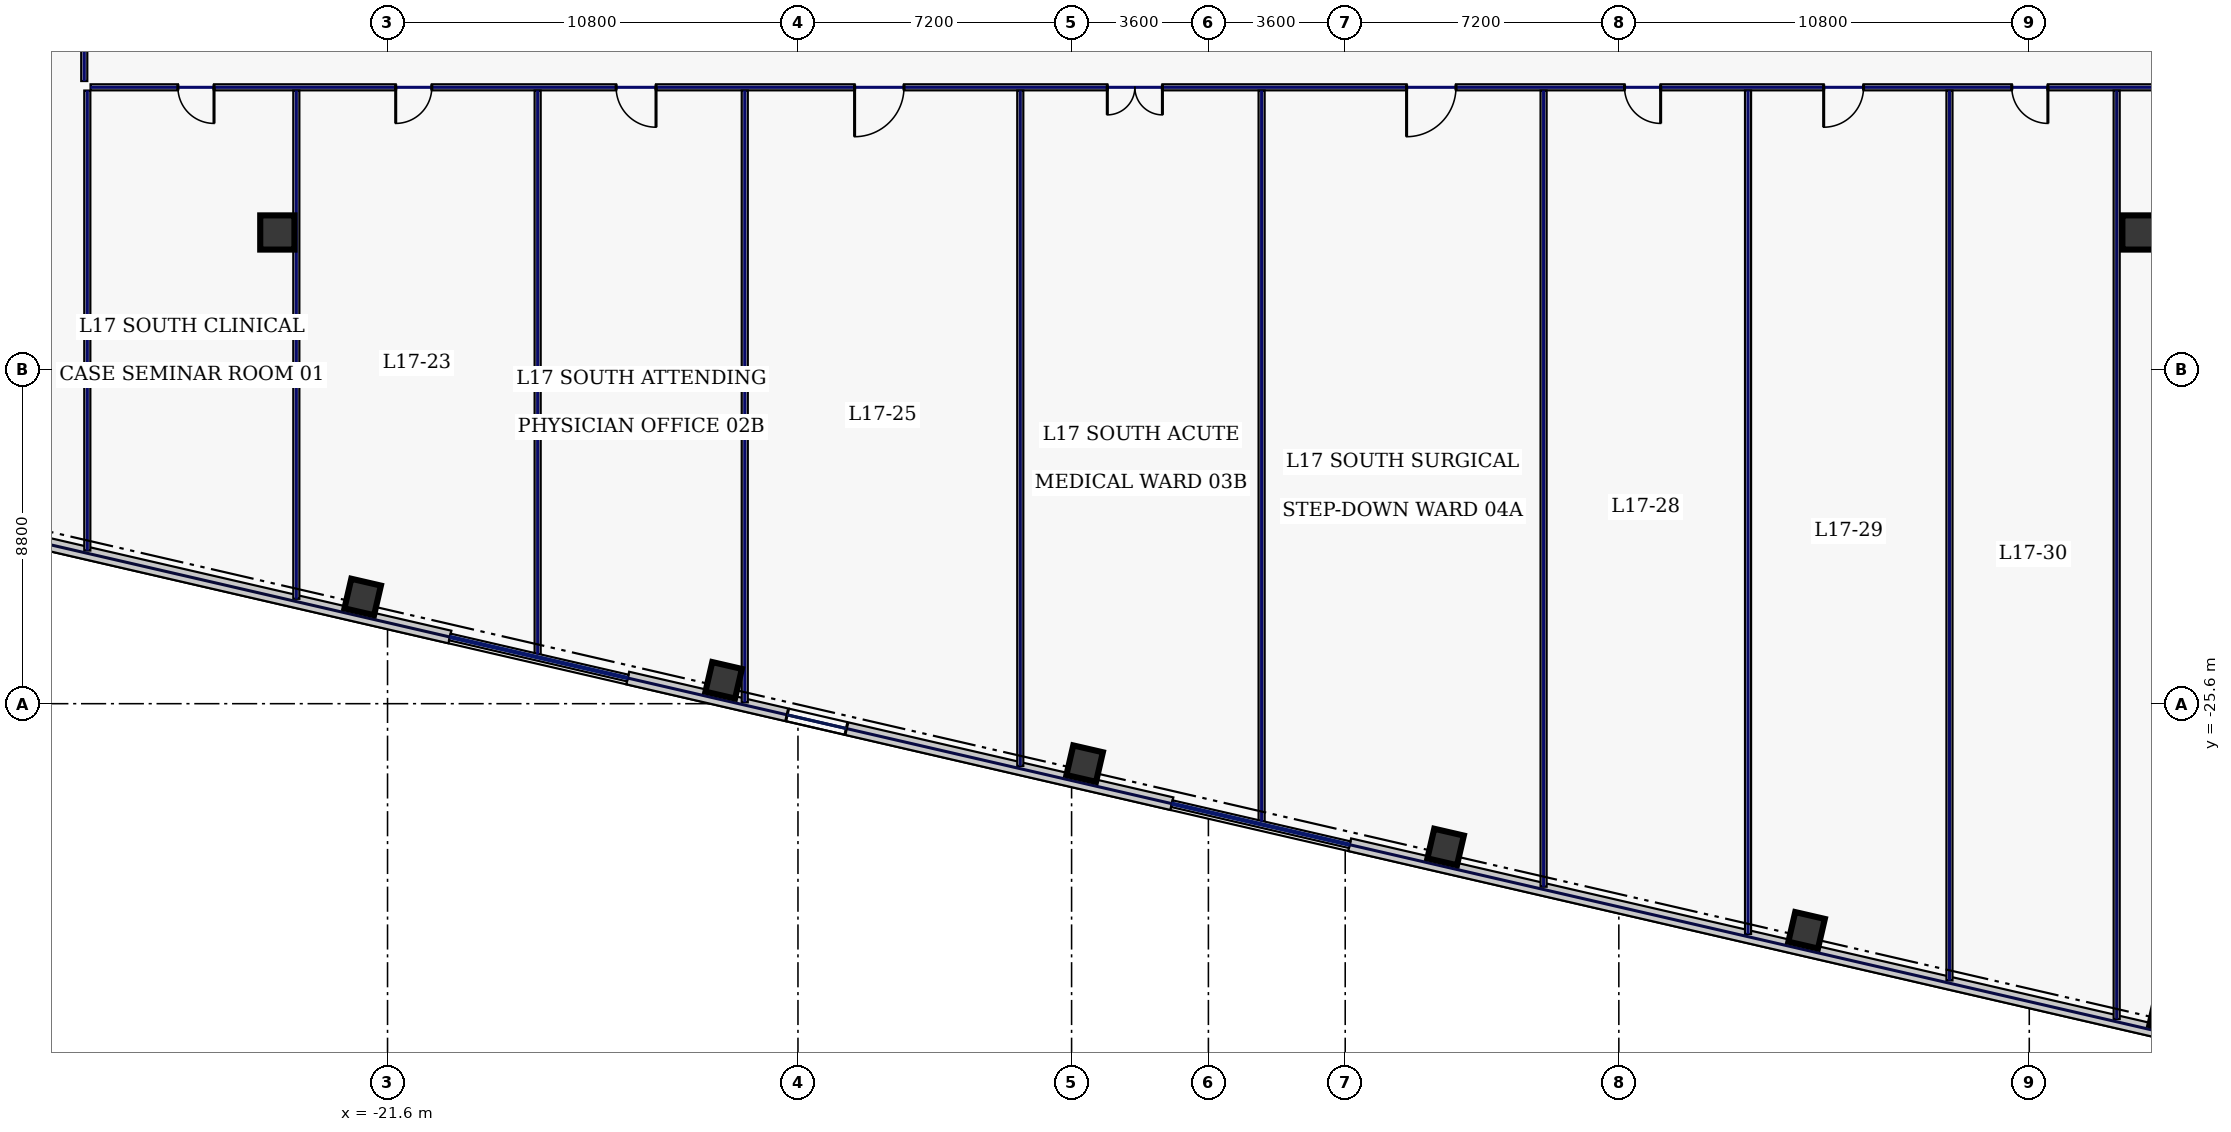
"""IFC4 building model, lengths in metres.
Left out: names, types, materials, properties, quantities, classifications, styles, units other than length and angle.
Written with IfcOpenShell. Run it as: python <this file> out.ifc"""

import sys

from ifc_helpers import new_model, si_unit, direction, frame, frame_2d, origin, origin_2d, place, context, subcontext, project, spatial, rectangle, hollow_rectangle, extrude, element, fill, save


model = new_model("IFC4")
c1 = context("Model", 3, precision=1e-05, world=origin(), true_north=direction((0.0, 1.0)))
c2 = subcontext(c1, "Body", "Model", "MODEL_VIEW")
j1 = project(units=[si_unit("LENGTHUNIT", "METRE"), si_unit("PLANEANGLEUNIT", "RADIAN")], contexts=[c1])
p1 = place(None, origin())
s1 = spatial("IfcSite", under=j1, at=p1, CompositionType="ELEMENT")
p2 = place(p1, origin())
s2 = spatial("IfcBuilding", under=s1, at=p2, CompositionType="ELEMENT")
p3 = place(p2, frame((0.0, 0.0, 79.4)))
s3 = spatial("IfcBuildingStorey", under=s2, at=p3, CompositionType="ELEMENT", Elevation=79.4)
for number, where, z_axis, x_axis in (
    (1, (-24.5, -13.2, 0.0), (0.0, 0.0, 1.0), (1.0, 0.0, 0.0)),
    (2, (24.5, -13.2, 0.0), (0.0, 0.0, 1.0), (1.0, 0.0, 0.0)),
):
    element("IfcColumn", number, at=place(p3, frame(where, z_axis=z_axis, x_axis=x_axis)), inside=s3, PredefinedType="COLUMN", context=c2, shape_type="SweptSolid", body=[
        extrude(hollow_rectangle(XDim=0.9, YDim=0.9, WallThickness=0.04, at=origin_2d()), origin(), (0.0, 0.0, 1.0), 3.68),
    ])
for number, where, z_axis, x_axis in (
    (3, (-22.254, -22.792, 0.0), (0.0, 0.0, 1.0), (0.974, -0.225, 0.0)),
    (4, (-12.755, -24.985, 0.0), (0.0, 0.0, 1.0), (0.974, -0.225, 0.0)),
    (5, (-3.256, -27.178, 0.0), (0.0, 0.0, 1.0), (0.974, -0.225, 0.0)),
    (6, (6.242, -29.371, 0.0), (0.0, 0.0, 1.0), (0.974, -0.225, 0.0)),
    (7, (15.741, -31.564, 0.0), (0.0, 0.0, 1.0), (0.974, -0.225, 0.0)),
    (8, (25.24, -33.757, 0.0), (0.0, 0.0, 1.0), (0.974, -0.225, 0.0)),
):
    element("IfcColumn", number, at=place(p3, frame(where, z_axis=z_axis, x_axis=x_axis)), inside=s3, PredefinedType="COLUMN", context=c2, shape_type="SweptSolid", body=[
        extrude(hollow_rectangle(XDim=0.8, YDim=0.8, WallThickness=0.036, at=origin_2d()), origin(), (0.0, 0.0, 1.0), 3.68),
    ])
p4 = place(p3, frame((-42.029, -18.75, 0.0), z_axis=(0.0, 0.0, 1.0), x_axis=(0.97436993772, -0.224951604723, 0.0)))
e9 = element("IfcWall", 9, at=p4, inside=s3, PredefinedType="STANDARD", context=c2, shape_type="SweptSolid", body=[
    extrude(rectangle(XDim=22.651, YDim=0.34, at=frame_2d((11.326, 0.0))), origin(), (0.0, 0.0, 1.0), 2.075),
])
p5 = place(p4, frame((2.512, 0.0, 0.22)))
e10 = element("IfcOpeningElement", 10, at=p5, cuts=e9, PredefinedType="OPENING", context=c2, shape_type="SweptSolid", body=[
    extrude(rectangle(XDim=1.6, YDim=1.2, at=frame_2d((0.8, 0.6))), frame((0.0, 0.18, 0.0), z_axis=(0.0, -1.0, 0.0), x_axis=(1.0, 0.0, 0.0)), (0.0, 0.0, 1.0), 0.36),
])
p6 = place(p4, frame((6.997, 0.0, 0.22)))
e11 = element("IfcOpeningElement", 11, at=p6, cuts=e9, PredefinedType="OPENING", context=c2, shape_type="SweptSolid", body=[
    extrude(rectangle(XDim=1.6, YDim=1.2, at=frame_2d((0.8, 0.6))), frame((0.0, 0.18, 0.0), z_axis=(0.0, -1.0, 0.0), x_axis=(1.0, 0.0, 0.0)), (0.0, 0.0, 1.0), 0.36),
])
p7 = place(p3, frame((-15.281, -24.925, 0.0), z_axis=(0.0, 0.0, 1.0), x_axis=(0.974370193991, -0.22495049469, 0.0)))
e12 = element("IfcWall", 12, at=p7, inside=s3, PredefinedType="STANDARD", context=c2, shape_type="SweptSolid", body=[
    extrude(rectangle(XDim=14.697, YDim=0.34, at=frame_2d((7.349, 0.0))), origin(), (0.0, 0.0, 1.0), 3.68),
])
p8 = place(p7, frame((4.306, 0.0, 0.22)))
e13 = element("IfcOpeningElement", 13, at=p8, cuts=e12, PredefinedType="OPENING", context=c2, shape_type="SweptSolid", body=[
    extrude(rectangle(XDim=1.6, YDim=1.2, at=frame_2d((0.8, 0.6))), frame((0.0, 0.18, 0.0), z_axis=(0.0, -1.0, 0.0), x_axis=(1.0, 0.0, 0.0)), (0.0, 0.0, 1.0), 0.36),
])
p9 = place(p3, frame((3.717, -29.311, 0.0), z_axis=(0.0, 0.0, 1.0), x_axis=(0.97436993772, -0.224951604723, 0.0)))
e14 = element("IfcWall", 14, at=p9, inside=s3, PredefinedType="STANDARD", context=c2, shape_type="SweptSolid", body=[
    extrude(rectangle(XDim=22.651, YDim=0.34, at=frame_2d((11.326, 0.0))), origin(), (0.0, 0.0, 1.0), 3.68),
])
p10 = place(p3, frame((-29.58, -9.215, 0.0), z_axis=(0.0, 0.0, 1.0), x_axis=(0.0, 1.0, 0.0)))
e15 = element("IfcWall", 15, at=p10, inside=s3, PredefinedType="PARTITIONING", context=c2, shape_type="SweptSolid", body=[
    extrude(rectangle(XDim=18.63, YDim=0.16, at=frame_2d((9.315, 0.0))), origin(), (0.0, 0.0, 1.0), 3.68),
])
p11 = place(p10, frame((1.769, 0.0, 0.0)))
e16 = element("IfcOpeningElement", 16, at=p11, cuts=e15, PredefinedType="OPENING", context=c2, shape_type="SweptSolid", body=[
    extrude(rectangle(XDim=0.95, YDim=2.2, at=frame_2d((0.475, 1.1))), frame((0.0, 0.09, 0.0), z_axis=(0.0, -1.0, 0.0), x_axis=(1.0, 0.0, 0.0)), (0.0, 0.0, 1.0), 0.18),
])
p12 = place(p10, frame((5.6, 0.0, 0.0)))
e17 = element("IfcOpeningElement", 17, at=p12, cuts=e15, PredefinedType="OPENING", context=c2, shape_type="SweptSolid", body=[
    extrude(rectangle(XDim=0.95, YDim=2.2, at=frame_2d((0.475, 1.1))), frame((0.0, 0.09, 0.0), z_axis=(0.0, -1.0, 0.0), x_axis=(1.0, 0.0, 0.0)), (0.0, 0.0, 1.0), 0.18),
])
p13 = place(p10, frame((10.8, 0.0, 0.0)))
e18 = element("IfcOpeningElement", 18, at=p13, cuts=e15, PredefinedType="OPENING", context=c2, shape_type="SweptSolid", body=[
    extrude(rectangle(XDim=0.95, YDim=2.2, at=frame_2d((0.475, 1.1))), frame((0.0, 0.09, 0.0), z_axis=(0.0, -1.0, 0.0), x_axis=(1.0, 0.0, 0.0)), (0.0, 0.0, 1.0), 0.18),
])
p14 = place(p10, frame((15.981, 0.0, 0.0)))
e19 = element("IfcOpeningElement", 19, at=p14, cuts=e15, PredefinedType="OPENING", context=c2, shape_type="SweptSolid", body=[
    extrude(rectangle(XDim=0.95, YDim=2.2, at=frame_2d((0.475, 1.1))), frame((0.0, 0.09, 0.0), z_axis=(0.0, -1.0, 0.0), x_axis=(1.0, 0.0, 0.0)), (0.0, 0.0, 1.0), 0.18),
])
p15 = place(p3, frame((29.415, -9.38, 0.0), z_axis=(0.0, 0.0, 1.0), x_axis=(-1.0, 0.0, 0.0)))
e20 = element("IfcWall", 20, at=p15, inside=s3, PredefinedType="PARTITIONING", context=c2, shape_type="SweptSolid", body=[
    extrude(rectangle(XDim=58.83, YDim=0.16, at=frame_2d((29.415, 0.0))), origin(), (0.0, 0.0, 1.0), 3.68),
])
p16 = place(p15, frame((55.581, 0.0, 0.0)))
e21 = element("IfcOpeningElement", 21, at=p16, cuts=e20, PredefinedType="OPENING", context=c2, shape_type="SweptSolid", body=[
    extrude(rectangle(XDim=0.95, YDim=2.2, at=frame_2d((0.475, 1.1))), frame((0.0, 0.09, 0.0), z_axis=(0.0, -1.0, 0.0), x_axis=(1.0, 0.0, 0.0)), (0.0, 0.0, 1.0), 0.18),
])
p17 = place(p15, frame((49.85, 0.0, 0.0)))
e22 = element("IfcOpeningElement", 22, at=p17, cuts=e20, PredefinedType="OPENING", context=c2, shape_type="SweptSolid", body=[
    extrude(rectangle(XDim=0.95, YDim=2.2, at=frame_2d((0.475, 1.1))), frame((0.0, 0.09, 0.0), z_axis=(0.0, -1.0, 0.0), x_axis=(1.0, 0.0, 0.0)), (0.0, 0.0, 1.0), 0.18),
])
p18 = place(p15, frame((43.95, 0.0, 0.0)))
e23 = element("IfcOpeningElement", 23, at=p18, cuts=e20, PredefinedType="OPENING", context=c2, shape_type="SweptSolid", body=[
    extrude(rectangle(XDim=1.05, YDim=2.2, at=frame_2d((0.525, 1.1))), frame((0.0, 0.09, 0.0), z_axis=(0.0, -1.0, 0.0), x_axis=(1.0, 0.0, 0.0)), (0.0, 0.0, 1.0), 0.18),
])
p19 = place(p15, frame((37.425, 0.0, 0.0)))
e24 = element("IfcOpeningElement", 24, at=p19, cuts=e20, PredefinedType="OPENING", context=c2, shape_type="SweptSolid", body=[
    extrude(rectangle(XDim=1.3, YDim=2.2, at=frame_2d((0.65, 1.1))), frame((0.0, 0.09, 0.0), z_axis=(0.0, -1.0, 0.0), x_axis=(1.0, 0.0, 0.0)), (0.0, 0.0, 1.0), 0.18),
])
p20 = place(p15, frame((30.625, 0.0, 0.0)))
e25 = element("IfcOpeningElement", 25, at=p20, cuts=e20, PredefinedType="OPENING", context=c2, shape_type="SweptSolid", body=[
    extrude(rectangle(XDim=1.45, YDim=2.2, at=frame_2d((0.725, 1.1))), frame((0.0, 0.09, 0.0), z_axis=(0.0, -1.0, 0.0), x_axis=(1.0, 0.0, 0.0)), (0.0, 0.0, 1.0), 0.18),
])
p21 = place(p15, frame((22.9, 0.0, 0.0)))
e26 = element("IfcOpeningElement", 26, at=p21, cuts=e20, PredefinedType="OPENING", context=c2, shape_type="SweptSolid", body=[
    extrude(rectangle(XDim=1.3, YDim=2.2, at=frame_2d((0.65, 1.1))), frame((0.0, 0.09, 0.0), z_axis=(0.0, -1.0, 0.0), x_axis=(1.0, 0.0, 0.0)), (0.0, 0.0, 1.0), 0.18),
])
p22 = place(p15, frame((17.515, 0.0, 0.0)))
e27 = element("IfcOpeningElement", 27, at=p22, cuts=e20, PredefinedType="OPENING", context=c2, shape_type="SweptSolid", body=[
    extrude(rectangle(XDim=0.95, YDim=2.2, at=frame_2d((0.475, 1.1))), frame((0.0, 0.09, 0.0), z_axis=(0.0, -1.0, 0.0), x_axis=(1.0, 0.0, 0.0)), (0.0, 0.0, 1.0), 0.18),
])
p23 = place(p15, frame((12.175, 0.0, 0.0)))
e28 = element("IfcOpeningElement", 28, at=p23, cuts=e20, PredefinedType="OPENING", context=c2, shape_type="SweptSolid", body=[
    extrude(rectangle(XDim=1.05, YDim=2.2, at=frame_2d((0.525, 1.1))), frame((0.0, 0.09, 0.0), z_axis=(0.0, -1.0, 0.0), x_axis=(1.0, 0.0, 0.0)), (0.0, 0.0, 1.0), 0.18),
])
p24 = place(p15, frame((7.325, 0.0, 0.0)))
e29 = element("IfcOpeningElement", 29, at=p24, cuts=e20, PredefinedType="OPENING", context=c2, shape_type="SweptSolid", body=[
    extrude(rectangle(XDim=0.95, YDim=2.2, at=frame_2d((0.475, 1.1))), frame((0.0, 0.09, 0.0), z_axis=(0.0, -1.0, 0.0), x_axis=(1.0, 0.0, 0.0)), (0.0, 0.0, 1.0), 0.18),
])
p25 = place(p15, frame((2.639, 0.0, 0.0)))
e30 = element("IfcOpeningElement", 30, at=p25, cuts=e20, PredefinedType="OPENING", context=c2, shape_type="SweptSolid", body=[
    extrude(rectangle(XDim=0.95, YDim=2.2, at=frame_2d((0.475, 1.1))), frame((0.0, 0.09, 0.0), z_axis=(0.0, -1.0, 0.0), x_axis=(1.0, 0.0, 0.0)), (0.0, 0.0, 1.0), 0.18),
])
p26 = place(p3, frame((-29.5, -21.571, 0.0), z_axis=(0.0, 0.0, 1.0), x_axis=(0.0, 1.0, 0.0)))
e31 = element("IfcWall", 31, at=p26, inside=s3, PredefinedType="PARTITIONING", context=c2, shape_type="SweptSolid", body=[
    extrude(rectangle(XDim=12.105, YDim=0.16, at=frame_2d((6.053, 0.0))), origin(), (0.0, 0.0, 1.0), 3.68),
])
p27 = place(p3, frame((-24.0, -22.84, 0.0), z_axis=(0.0, 0.0, 1.0), x_axis=(0.0, 1.0, 0.0)))
e32 = element("IfcWall", 32, at=p27, inside=s3, PredefinedType="PARTITIONING", context=c2, shape_type="SweptSolid", body=[
    extrude(rectangle(XDim=13.375, YDim=0.16, at=frame_2d((6.688, 0.0))), origin(), (0.0, 0.0, 1.0), 3.68),
])
p28 = place(p3, frame((-12.2, -25.565, 0.0), z_axis=(0.0, 0.0, 1.0), x_axis=(0.0, 1.0, 0.0)))
e33 = element("IfcWall", 33, at=p28, inside=s3, PredefinedType="PARTITIONING", context=c2, shape_type="SweptSolid", body=[
    extrude(rectangle(XDim=16.1, YDim=0.16, at=frame_2d((8.05, 0.0))), origin(), (0.0, 0.0, 1.0), 3.68),
])
p29 = place(p3, frame((1.4, -28.704, 0.0), z_axis=(0.0, 0.0, 1.0), x_axis=(0.0, 1.0, 0.0)))
e34 = element("IfcWall", 34, at=p29, inside=s3, PredefinedType="PARTITIONING", context=c2, shape_type="SweptSolid", body=[
    extrude(rectangle(XDim=19.239, YDim=0.16, at=frame_2d((9.62, 0.0))), origin(), (0.0, 0.0, 1.0), 3.68),
])
p30 = place(p3, frame((14.2, -31.659, 0.0), z_axis=(0.0, 0.0, 1.0), x_axis=(0.0, 1.0, 0.0)))
e35 = element("IfcWall", 35, at=p30, inside=s3, PredefinedType="PARTITIONING", context=c2, shape_type="SweptSolid", body=[
    extrude(rectangle(XDim=22.194, YDim=0.16, at=frame_2d((11.097, 0.0))), origin(), (0.0, 0.0, 1.0), 3.68),
])
p31 = place(p3, frame((23.9, -33.899, 0.0), z_axis=(0.0, 0.0, 1.0), x_axis=(0.0, 1.0, 0.0)))
e36 = element("IfcWall", 36, at=p31, inside=s3, PredefinedType="PARTITIONING", context=c2, shape_type="SweptSolid", body=[
    extrude(rectangle(XDim=24.434, YDim=0.16, at=frame_2d((12.217, 0.0))), origin(), (0.0, 0.0, 1.0), 1.475),
])
p32 = place(p3, frame((-17.65, -24.306, 0.0), z_axis=(0.0, 0.0, 1.0), x_axis=(0.0, 1.0, 0.0)))
e37 = element("IfcWall", 37, at=p32, inside=s3, PredefinedType="PARTITIONING", context=c2, shape_type="SweptSolid", body=[
    extrude(rectangle(XDim=14.841, YDim=0.16, at=frame_2d((7.421, 0.0))), origin(), (0.0, 0.0, 1.0), 3.68),
])
p33 = place(p3, frame((-4.95, -27.238, 0.0), z_axis=(0.0, 0.0, 1.0), x_axis=(0.0, 1.0, 0.0)))
e38 = element("IfcWall", 38, at=p33, inside=s3, PredefinedType="PARTITIONING", context=c2, shape_type="SweptSolid", body=[
    extrude(rectangle(XDim=17.773, YDim=0.16, at=frame_2d((8.887, 0.0))), origin(), (0.0, 0.0, 1.0), 1.475),
])
p34 = place(p3, frame((8.82, -30.417, 0.0), z_axis=(0.0, 0.0, 1.0), x_axis=(0.0, 1.0, 0.0)))
e39 = element("IfcWall", 39, at=p34, inside=s3, PredefinedType="PARTITIONING", context=c2, shape_type="SweptSolid", body=[
    extrude(rectangle(XDim=20.952, YDim=0.16, at=frame_2d((10.476, 0.0))), origin(), (0.0, 0.0, 1.0), 3.68),
])
p35 = place(p3, frame((19.5, -32.883, 0.0), z_axis=(0.0, 0.0, 1.0), x_axis=(0.0, 1.0, 0.0)))
e40 = element("IfcWall", 40, at=p35, inside=s3, PredefinedType="PARTITIONING", context=c2, shape_type="SweptSolid", body=[
    extrude(rectangle(XDim=23.418, YDim=0.16, at=frame_2d((11.709, 0.0))), origin(), (0.0, 0.0, 1.0), 3.68),
])
p36 = place(p8, origin())
e41 = element("IfcWindow", 41, at=p36, inside=s3, PartitioningType="SINGLE_PANEL", PredefinedType="WINDOW", context=c2, shape_type="SweptSolid", body=[
    extrude(rectangle(XDim=1.6, YDim=1.2, at=frame_2d((0.8, 0.6))), frame((0.0, 0.03, 0.0), z_axis=(0.0, -1.0, 0.0), x_axis=(1.0, 0.0, 0.0)), (0.0, 0.0, 1.0), 0.06),
])
fill(e13, e41)
p37 = place(p16, origin())
e42 = element("IfcDoor", 42, at=p37, inside=s3, OperationType="SINGLE_SWING_LEFT", PredefinedType="DOOR", context=c2, shape_type="SweptSolid", body=[
    extrude(rectangle(XDim=0.95, YDim=2.2, at=frame_2d((0.475, 1.1))), frame((0.0, 0.025, 0.0), z_axis=(0.0, -1.0, 0.0), x_axis=(1.0, 0.0, 0.0)), (0.0, 0.0, 1.0), 0.05),
])
fill(e21, e42)
p38 = place(p17, origin())
e43 = element("IfcDoor", 43, at=p38, inside=s3, OperationType="SINGLE_SWING_RIGHT", PredefinedType="DOOR", context=c2, shape_type="SweptSolid", body=[
    extrude(rectangle(XDim=0.95, YDim=2.2, at=frame_2d((0.475, 1.1))), frame((0.0, 0.025, 0.0), z_axis=(0.0, -1.0, 0.0), x_axis=(1.0, 0.0, 0.0)), (0.0, 0.0, 1.0), 0.05),
])
fill(e22, e43)
p39 = place(p18, origin())
e44 = element("IfcDoor", 44, at=p39, inside=s3, OperationType="SINGLE_SWING_LEFT", PredefinedType="DOOR", context=c2, shape_type="SweptSolid", body=[
    extrude(rectangle(XDim=1.05, YDim=2.2, at=frame_2d((0.525, 1.1))), frame((0.0, 0.025, 0.0), z_axis=(0.0, -1.0, 0.0), x_axis=(1.0, 0.0, 0.0)), (0.0, 0.0, 1.0), 0.05),
])
fill(e23, e44)
p40 = place(p19, origin())
e45 = element("IfcDoor", 45, at=p40, inside=s3, OperationType="SINGLE_SWING_RIGHT", PredefinedType="DOOR", context=c2, shape_type="SweptSolid", body=[
    extrude(rectangle(XDim=1.3, YDim=2.2, at=frame_2d((0.65, 1.1))), frame((0.0, 0.025, 0.0), z_axis=(0.0, -1.0, 0.0), x_axis=(1.0, 0.0, 0.0)), (0.0, 0.0, 1.0), 0.05),
])
fill(e24, e45)
p41 = place(p20, origin())
e46 = element("IfcDoor", 46, at=p41, inside=s3, OperationType="DOUBLE_SWING_LEFT", PredefinedType="DOOR", context=c2, shape_type="SweptSolid", body=[
    extrude(rectangle(XDim=1.45, YDim=2.2, at=frame_2d((0.725, 1.1))), frame((0.0, 0.025, 0.0), z_axis=(0.0, -1.0, 0.0), x_axis=(1.0, 0.0, 0.0)), (0.0, 0.0, 1.0), 0.05),
])
fill(e25, e46)
p42 = place(p21, origin())
e47 = element("IfcDoor", 47, at=p42, inside=s3, OperationType="SINGLE_SWING_RIGHT", PredefinedType="DOOR", context=c2, shape_type="SweptSolid", body=[
    extrude(rectangle(XDim=1.3, YDim=2.2, at=frame_2d((0.65, 1.1))), frame((0.0, 0.025, 0.0), z_axis=(0.0, -1.0, 0.0), x_axis=(1.0, 0.0, 0.0)), (0.0, 0.0, 1.0), 0.05),
])
fill(e26, e47)
p43 = place(p22, origin())
e48 = element("IfcDoor", 48, at=p43, inside=s3, OperationType="SINGLE_SWING_LEFT", PredefinedType="DOOR", context=c2, shape_type="SweptSolid", body=[
    extrude(rectangle(XDim=0.95, YDim=2.2, at=frame_2d((0.475, 1.1))), frame((0.0, 0.025, 0.0), z_axis=(0.0, -1.0, 0.0), x_axis=(1.0, 0.0, 0.0)), (0.0, 0.0, 1.0), 0.05),
])
fill(e27, e48)
p44 = place(p23, origin())
e49 = element("IfcDoor", 49, at=p44, inside=s3, OperationType="SINGLE_SWING_RIGHT", PredefinedType="DOOR", context=c2, shape_type="SweptSolid", body=[
    extrude(rectangle(XDim=1.05, YDim=2.2, at=frame_2d((0.525, 1.1))), frame((0.0, 0.025, 0.0), z_axis=(0.0, -1.0, 0.0), x_axis=(1.0, 0.0, 0.0)), (0.0, 0.0, 1.0), 0.05),
])
fill(e28, e49)
p45 = place(p24, origin())
e50 = element("IfcDoor", 50, at=p45, inside=s3, OperationType="SINGLE_SWING_LEFT", PredefinedType="DOOR", context=c2, shape_type="SweptSolid", body=[
    extrude(rectangle(XDim=0.95, YDim=2.2, at=frame_2d((0.475, 1.1))), frame((0.0, 0.025, 0.0), z_axis=(0.0, -1.0, 0.0), x_axis=(1.0, 0.0, 0.0)), (0.0, 0.0, 1.0), 0.05),
])
fill(e29, e50)
save(model, sys.argv[1])
